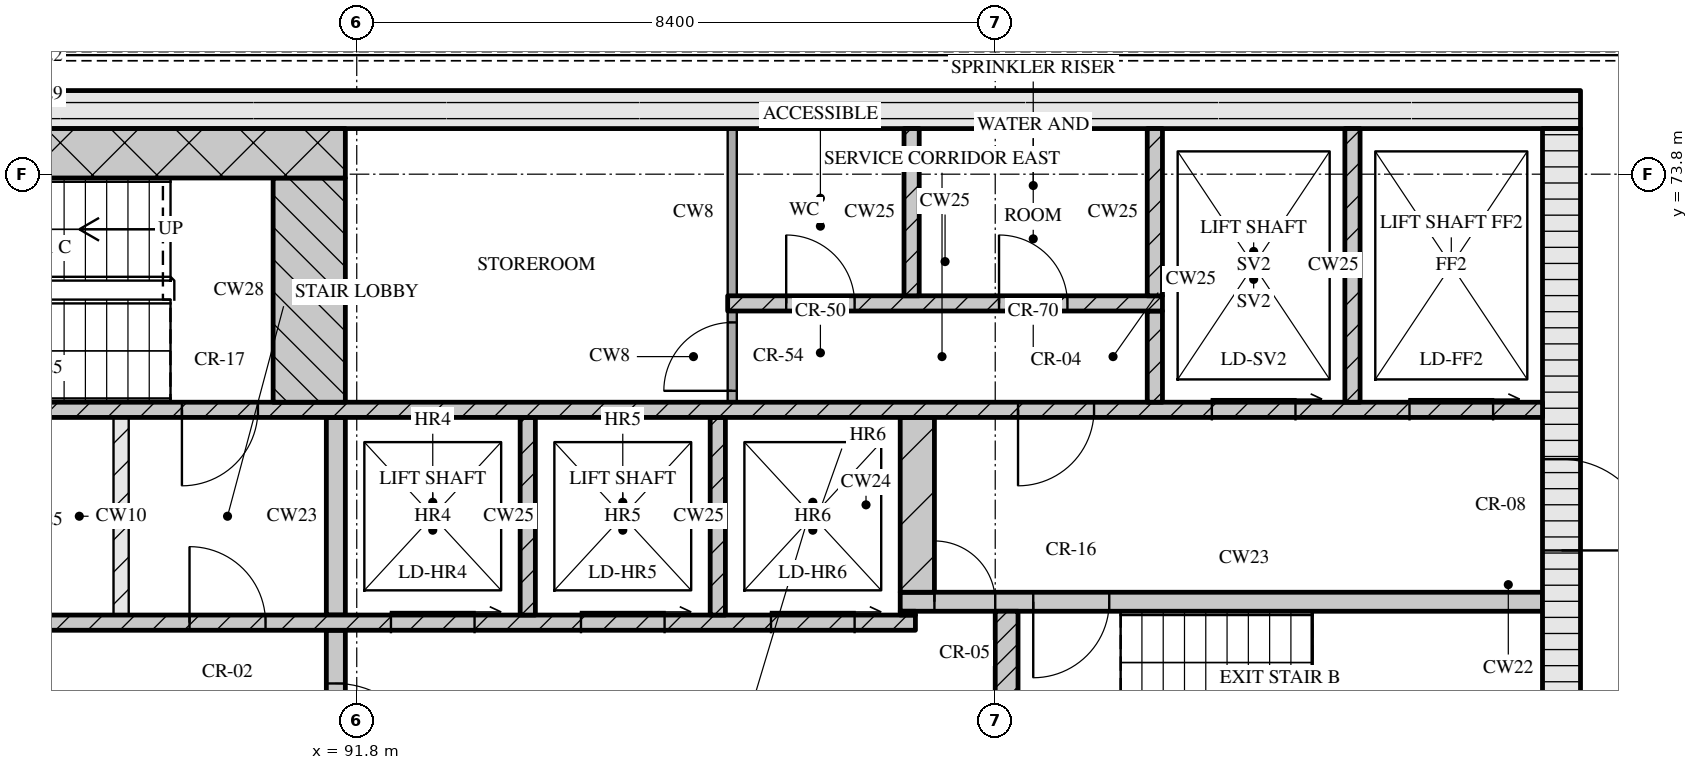
"""IFC4 building model, lengths in metres.
Left out: names, types, materials, properties, quantities, classifications, styles, units other than length and angle.
Written with IfcOpenShell. Run it as: python <this file> out.ifc"""

import sys

from ifc_helpers import new_model, si_unit, direction, frame, frame_2d, origin, place, context, subcontext, project, spatial, rectangle, extrude, element, fill, save


model = new_model("IFC4")
c1 = context("Model", 3, precision=1e-05, world=origin(), true_north=direction((0.0, 1.0)))
c2 = subcontext(c1, "Body", "Model", "MODEL_VIEW")
j1 = project(units=[si_unit("LENGTHUNIT", "METRE"), si_unit("PLANEANGLEUNIT", "RADIAN")], contexts=[c1])
p1 = place(None, origin())
s1 = spatial("IfcSite", under=j1, at=p1, CompositionType="ELEMENT")
p2 = place(p1, origin())
s2 = spatial("IfcBuilding", under=s1, at=p2, CompositionType="ELEMENT")
p3 = place(p2, frame((0.0, 0.0, 295.95)))
s3 = spatial("IfcBuildingStorey", under=s2, at=p3, CompositionType="ELEMENT", Elevation=295.95)
p4 = place(p3, frame((67.3, 74.65, 0.0), z_axis=(0.0, 0.0, 1.0), x_axis=(1.0, 0.0, 0.0)))
e1 = element("IfcWall", 1, at=p4, inside=s3, PredefinedType="SOLIDWALL", context=c2, shape_type="SweptSolid", body=[
    extrude(rectangle(XDim=40.6, YDim=0.5, at=frame_2d((20.3, 0.0))), origin(), (0.0, 0.0, 1.0), 3.32),
])
p5 = place(p3, frame((107.65, 62.4, 0.0), z_axis=(0.0, 0.0, 1.0), x_axis=(0.0, 1.0, 0.0)))
e2 = element("IfcWall", 2, at=p5, inside=s3, PredefinedType="SOLIDWALL", context=c2, shape_type="SweptSolid", body=[
    extrude(rectangle(XDim=12.0, YDim=0.5, at=frame_2d((6.0, 0.0))), origin(), (0.0, 0.0, 1.0), 3.32),
])
p6 = place(p5, frame((6.45, 0.0, 0.0)))
e3 = element("IfcOpeningElement", 3, at=p6, cuts=e2, PredefinedType="OPENING", context=c2, shape_type="SweptSolid", body=[
    extrude(rectangle(XDim=1.2, YDim=2.1, at=frame_2d((0.6, 1.05))), frame((0.0, 0.26, 0.0), z_axis=(0.0, -1.0, 0.0), x_axis=(1.0, 0.0, 0.0)), (0.0, 0.0, 1.0), 0.52),
])
p7 = place(p3, frame((91.525, 65.2, 0.0), z_axis=(0.0, 0.0, 1.0), x_axis=(0.0, 1.0, 0.0)))
e4 = element("IfcWall", 4, at=p7, inside=s3, PredefinedType="SOLIDWALL", context=c2, shape_type="SweptSolid", body=[
    extrude(rectangle(XDim=2.6, YDim=0.25, at=frame_2d((1.3, 0.0))), origin(), (0.0, 0.0, 1.0), 3.32),
])
p8 = place(p7, frame((0.7, 0.0, 0.0)))
e5 = element("IfcOpeningElement", 5, at=p8, cuts=e4, PredefinedType="OPENING", context=c2, shape_type="SweptSolid", body=[
    extrude(rectangle(XDim=1.2, YDim=2.1, at=frame_2d((0.6, 1.05))), frame((0.0, 0.135, 0.0), z_axis=(0.0, -1.0, 0.0), x_axis=(1.0, 0.0, 0.0)), (0.0, 0.0, 1.0), 0.27),
])
p9 = place(p3, frame((100.35, 65.2, 0.0), z_axis=(0.0, 0.0, 1.0), x_axis=(0.0, 1.0, 0.0)))
e6 = element("IfcWall", 6, at=p9, inside=s3, PredefinedType="SOLIDWALL", context=c2, shape_type="SweptSolid", body=[
    extrude(rectangle(XDim=2.85, YDim=0.3, at=frame_2d((1.425, 0.0))), origin(), (0.0, 0.0, 1.0), 3.32),
])
p10 = place(p3, frame((76.05, 67.9, 0.0), z_axis=(0.0, 0.0, 1.0), x_axis=(1.0, 0.0, 0.0)))
e7 = element("IfcWall", 7, at=p10, inside=s3, PredefinedType="SOLIDWALL", context=c2, shape_type="SweptSolid", body=[
    extrude(rectangle(XDim=23.1, YDim=0.2, at=frame_2d((11.55, 0.0))), origin(), (0.0, 0.0, 1.0), 3.32),
])
p11 = place(p10, frame((1.95, 0.0, 0.0)))
e8 = element("IfcOpeningElement", 8, at=p11, cuts=e7, PredefinedType="OPENING", context=c2, shape_type="SweptSolid", body=[
    extrude(rectangle(XDim=0.9, YDim=2.1, at=frame_2d((0.45, 1.05))), frame((0.0, 0.11, 0.0), z_axis=(0.0, -1.0, 0.0), x_axis=(1.0, 0.0, 0.0)), (0.0, 0.0, 1.0), 0.22),
])
p12 = place(p10, frame((5.66, 0.0, 0.0)))
e9 = element("IfcOpeningElement", 9, at=p12, cuts=e7, PredefinedType="OPENING", context=c2, shape_type="SweptSolid", body=[
    extrude(rectangle(XDim=0.9, YDim=2.1, at=frame_2d((0.45, 1.05))), frame((0.0, 0.11, 0.0), z_axis=(0.0, -1.0, 0.0), x_axis=(1.0, 0.0, 0.0)), (0.0, 0.0, 1.0), 0.22),
])
p13 = place(p10, frame((9.7, 0.0, 0.0)))
e10 = element("IfcOpeningElement", 10, at=p13, cuts=e7, PredefinedType="OPENING", context=c2, shape_type="SweptSolid", body=[
    extrude(rectangle(XDim=0.9, YDim=2.1, at=frame_2d((0.45, 1.05))), frame((0.0, 0.11, 0.0), z_axis=(0.0, -1.0, 0.0), x_axis=(1.0, 0.0, 0.0)), (0.0, 0.0, 1.0), 0.22),
])
p14 = place(p10, frame((13.55, 0.0, 0.0)))
e11 = element("IfcOpeningElement", 11, at=p14, cuts=e7, PredefinedType="OPENING", context=c2, shape_type="SweptSolid", body=[
    extrude(rectangle(XDim=1.0, YDim=2.1, at=frame_2d((0.5, 1.05))), frame((0.0, 0.11, 0.0), z_axis=(0.0, -1.0, 0.0), x_axis=(1.0, 0.0, 0.0)), (0.0, 0.0, 1.0), 0.22),
])
p15 = place(p10, frame((16.2, 0.0, 0.0)))
e12 = element("IfcOpeningElement", 12, at=p15, cuts=e7, PredefinedType="OPENING", context=c2, shape_type="SweptSolid", body=[
    extrude(rectangle(XDim=1.1, YDim=2.1, at=frame_2d((0.55, 1.05))), frame((0.0, 0.11, 0.0), z_axis=(0.0, -1.0, 0.0), x_axis=(1.0, 0.0, 0.0)), (0.0, 0.0, 1.0), 0.22),
])
p16 = place(p10, frame((18.7, 0.0, 0.0)))
e13 = element("IfcOpeningElement", 13, at=p16, cuts=e7, PredefinedType="OPENING", context=c2, shape_type="SweptSolid", body=[
    extrude(rectangle(XDim=1.1, YDim=2.1, at=frame_2d((0.55, 1.05))), frame((0.0, 0.11, 0.0), z_axis=(0.0, -1.0, 0.0), x_axis=(1.0, 0.0, 0.0)), (0.0, 0.0, 1.0), 0.22),
])
p17 = place(p10, frame((21.2, 0.0, 0.0)))
e14 = element("IfcOpeningElement", 14, at=p17, cuts=e7, PredefinedType="OPENING", context=c2, shape_type="SweptSolid", body=[
    extrude(rectangle(XDim=1.1, YDim=2.1, at=frame_2d((0.55, 1.05))), frame((0.0, 0.11, 0.0), z_axis=(0.0, -1.0, 0.0), x_axis=(1.0, 0.0, 0.0)), (0.0, 0.0, 1.0), 0.22),
])
p18 = place(p3, frame((88.7, 68.0, 0.0), z_axis=(0.0, 0.0, 1.0), x_axis=(0.0, 1.0, 0.0)))
e15 = element("IfcWall", 15, at=p18, inside=s3, PredefinedType="PARTITIONING", context=c2, shape_type="SweptSolid", body=[
    extrude(rectangle(XDim=2.6, YDim=0.2, at=frame_2d((1.3, 0.0))), origin(), (0.0, 0.0, 1.0), 3.32),
])
p19 = place(p3, frame((91.525, 68.0, 0.0), z_axis=(0.0, 0.0, 1.0), x_axis=(0.0, 1.0, 0.0)))
e16 = element("IfcWall", 16, at=p19, inside=s3, PredefinedType="SOLIDWALL", context=c2, shape_type="SweptSolid", body=[
    extrude(rectangle(XDim=2.6, YDim=0.25, at=frame_2d((1.3, 0.0))), origin(), (0.0, 0.0, 1.0), 3.32),
])
for number, where, z_axis, x_axis in (
    (17, (94.05, 68.0, 0.0), (0.0, 0.0, 1.0), (0.0, 1.0, 0.0)),
    (18, (96.55, 68.0, 0.0), (0.0, 0.0, 1.0), (0.0, 1.0, 0.0)),
):
    element("IfcWall", number, at=place(p3, frame(where, z_axis=z_axis, x_axis=x_axis)), inside=s3, PredefinedType="SOLIDWALL", context=c2, shape_type="SweptSolid", body=[
        extrude(rectangle(XDim=2.6, YDim=0.2, at=frame_2d((1.3, 0.0))), origin(), (0.0, 0.0, 1.0), 3.32),
    ])
p20 = place(p3, frame((98.95, 68.025, 0.0), z_axis=(0.0, 0.0, 1.0), x_axis=(1.0, 0.0, 0.0)))
e19 = element("IfcWall", 19, at=p20, inside=s3, PredefinedType="SOLIDWALL", context=c2, shape_type="SweptSolid", body=[
    extrude(rectangle(XDim=0.2, YDim=0.05, at=frame_2d((0.1, 0.0))), origin(), (0.0, 0.0, 1.0), 3.32),
])
p21 = place(p3, frame((98.95, 68.175, 0.0), z_axis=(0.0, 0.0, 1.0), x_axis=(1.0, 0.0, 0.0)))
e20 = element("IfcWall", 20, at=p21, inside=s3, PredefinedType="SOLIDWALL", context=c2, shape_type="SweptSolid", body=[
    extrude(rectangle(XDim=8.45, YDim=0.25, at=frame_2d((4.225, 0.0))), origin(), (0.0, 0.0, 1.0), 3.32),
])
p22 = place(p21, frame((0.45, 0.0, 0.0)))
e21 = element("IfcOpeningElement", 21, at=p22, cuts=e20, PredefinedType="OPENING", context=c2, shape_type="SweptSolid", body=[
    extrude(rectangle(XDim=0.8, YDim=2.1, at=frame_2d((0.4, 1.05))), frame((0.0, 0.135, 0.0), z_axis=(0.0, -1.0, 0.0), x_axis=(1.0, 0.0, 0.0)), (0.0, 0.0, 1.0), 0.27),
])
p23 = place(p21, frame((1.75, 0.0, 0.0)))
e22 = element("IfcOpeningElement", 22, at=p23, cuts=e20, PredefinedType="OPENING", context=c2, shape_type="SweptSolid", body=[
    extrude(rectangle(XDim=1.0, YDim=2.1, at=frame_2d((0.5, 1.05))), frame((0.0, 0.135, 0.0), z_axis=(0.0, -1.0, 0.0), x_axis=(1.0, 0.0, 0.0)), (0.0, 0.0, 1.0), 0.27),
])
p24 = place(p3, frame((99.175, 68.3, 0.0), z_axis=(0.0, 0.0, 1.0), x_axis=(0.0, 1.0, 0.0)))
e23 = element("IfcWall", 23, at=p24, inside=s3, PredefinedType="SOLIDWALL", context=c2, shape_type="SweptSolid", body=[
    extrude(rectangle(XDim=2.3, YDim=0.45, at=frame_2d((1.15, 0.0))), origin(), (0.0, 0.0, 1.0), 3.32),
])
p25 = place(p3, frame((67.8, 70.7, 0.0), z_axis=(0.0, 0.0, 1.0), x_axis=(1.0, 0.0, 0.0)))
e24 = element("IfcWall", 24, at=p25, inside=s3, PredefinedType="SOLIDWALL", context=c2, shape_type="SweptSolid", body=[
    extrude(rectangle(XDim=39.6, YDim=0.2, at=frame_2d((19.8, 0.0))), origin(), (0.0, 0.0, 1.0), 3.32),
])
p26 = place(p25, frame((0.65, 0.0, 0.0)))
e25 = element("IfcOpeningElement", 25, at=p26, cuts=e24, PredefinedType="OPENING", context=c2, shape_type="SweptSolid", body=[
    extrude(rectangle(XDim=1.1, YDim=2.1, at=frame_2d((0.55, 1.05))), frame((0.0, 0.11, 0.0), z_axis=(0.0, -1.0, 0.0), x_axis=(1.0, 0.0, 0.0)), (0.0, 0.0, 1.0), 0.22),
])
p27 = place(p25, frame((3.25, 0.0, 0.0)))
e26 = element("IfcOpeningElement", 26, at=p27, cuts=e24, PredefinedType="OPENING", context=c2, shape_type="SweptSolid", body=[
    extrude(rectangle(XDim=1.1, YDim=2.1, at=frame_2d((0.55, 1.05))), frame((0.0, 0.11, 0.0), z_axis=(0.0, -1.0, 0.0), x_axis=(1.0, 0.0, 0.0)), (0.0, 0.0, 1.0), 0.22),
])
p28 = place(p25, frame((5.9, 0.0, 0.0)))
e27 = element("IfcOpeningElement", 27, at=p28, cuts=e24, PredefinedType="OPENING", context=c2, shape_type="SweptSolid", body=[
    extrude(rectangle(XDim=1.0, YDim=2.1, at=frame_2d((0.5, 1.05))), frame((0.0, 0.11, 0.0), z_axis=(0.0, -1.0, 0.0), x_axis=(1.0, 0.0, 0.0)), (0.0, 0.0, 1.0), 0.22),
])
p29 = place(p25, frame((21.7, 0.0, 0.0)))
e28 = element("IfcOpeningElement", 28, at=p29, cuts=e24, PredefinedType="OPENING", context=c2, shape_type="SweptSolid", body=[
    extrude(rectangle(XDim=1.0, YDim=2.1, at=frame_2d((0.5, 1.05))), frame((0.0, 0.11, 0.0), z_axis=(0.0, -1.0, 0.0), x_axis=(1.0, 0.0, 0.0)), (0.0, 0.0, 1.0), 0.22),
])
p30 = place(p25, frame((32.7, 0.0, 0.0)))
e29 = element("IfcOpeningElement", 29, at=p30, cuts=e24, PredefinedType="OPENING", context=c2, shape_type="SweptSolid", body=[
    extrude(rectangle(XDim=1.0, YDim=2.1, at=frame_2d((0.5, 1.05))), frame((0.0, 0.11, 0.0), z_axis=(0.0, -1.0, 0.0), x_axis=(1.0, 0.0, 0.0)), (0.0, 0.0, 1.0), 0.22),
])
p31 = place(p25, frame((35.25, 0.0, 0.0)))
e30 = element("IfcOpeningElement", 30, at=p31, cuts=e24, PredefinedType="OPENING", context=c2, shape_type="SweptSolid", body=[
    extrude(rectangle(XDim=1.1, YDim=2.1, at=frame_2d((0.55, 1.05))), frame((0.0, 0.11, 0.0), z_axis=(0.0, -1.0, 0.0), x_axis=(1.0, 0.0, 0.0)), (0.0, 0.0, 1.0), 0.22),
])
p32 = place(p25, frame((37.85, 0.0, 0.0)))
e31 = element("IfcOpeningElement", 31, at=p32, cuts=e24, PredefinedType="OPENING", context=c2, shape_type="SweptSolid", body=[
    extrude(rectangle(XDim=1.1, YDim=2.1, at=frame_2d((0.55, 1.05))), frame((0.0, 0.11, 0.0), z_axis=(0.0, -1.0, 0.0), x_axis=(1.0, 0.0, 0.0)), (0.0, 0.0, 1.0), 0.22),
])
p33 = place(p3, frame((91.175, 70.8, 0.0), z_axis=(0.0, 0.0, 1.0), x_axis=(0.0, 1.0, 0.0)))
e32 = element("IfcWall", 32, at=p33, inside=s3, PredefinedType="SOLIDWALL", context=c2, shape_type="SweptSolid", body=[
    extrude(rectangle(XDim=2.95, YDim=0.95, at=frame_2d((1.475, 0.0))), origin(), (0.0, 0.0, 1.0), 3.32),
])
p34 = place(p3, frame((96.74, 70.8, 0.0), z_axis=(0.0, 0.0, 1.0), x_axis=(0.0, 1.0, 0.0)))
e33 = element("IfcWall", 33, at=p34, inside=s3, PredefinedType="PARTITIONING", context=c2, shape_type="SweptSolid", body=[
    extrude(rectangle(XDim=1.2, YDim=0.12, at=frame_2d((0.6, 0.0))), origin(), (0.0, 0.0, 1.0), 3.32),
])
p35 = place(p34, frame((0.15, 0.0, 0.0)))
e34 = element("IfcOpeningElement", 34, at=p35, cuts=e33, PredefinedType="OPENING", context=c2, shape_type="SweptSolid", body=[
    extrude(rectangle(XDim=0.9, YDim=2.1, at=frame_2d((0.45, 1.05))), frame((0.0, 0.07, 0.0), z_axis=(0.0, -1.0, 0.0), x_axis=(1.0, 0.0, 0.0)), (0.0, 0.0, 1.0), 0.14),
])
p36 = place(p3, frame((102.3, 70.8, 0.0), z_axis=(0.0, 0.0, 1.0), x_axis=(0.0, 1.0, 0.0)))
e35 = element("IfcWall", 35, at=p36, inside=s3, PredefinedType="SOLIDWALL", context=c2, shape_type="SweptSolid", body=[
    extrude(rectangle(XDim=1.2, YDim=0.2, at=frame_2d((0.6, 0.0))), origin(), (0.0, 0.0, 1.0), 3.32),
])
p37 = place(p3, frame((104.9, 70.8, 0.0), z_axis=(0.0, 0.0, 1.0), x_axis=(0.0, 1.0, 0.0)))
e36 = element("IfcWall", 36, at=p37, inside=s3, PredefinedType="SOLIDWALL", context=c2, shape_type="SweptSolid", body=[
    extrude(rectangle(XDim=3.6, YDim=0.2, at=frame_2d((1.8, 0.0))), origin(), (0.0, 0.0, 1.0), 3.32),
])
p38 = place(p3, frame((96.68, 72.1, 0.0), z_axis=(0.0, 0.0, 1.0), x_axis=(1.0, 0.0, 0.0)))
e37 = element("IfcWall", 37, at=p38, inside=s3, PredefinedType="SOLIDWALL", context=c2, shape_type="SweptSolid", body=[
    extrude(rectangle(XDim=5.72, YDim=0.2, at=frame_2d((2.86, 0.0))), origin(), (0.0, 0.0, 1.0), 3.32),
])
p39 = place(p38, frame((0.77, 0.0, 0.0)))
e38 = element("IfcOpeningElement", 38, at=p39, cuts=e37, PredefinedType="OPENING", context=c2, shape_type="SweptSolid", body=[
    extrude(rectangle(XDim=0.9, YDim=2.1, at=frame_2d((0.45, 1.05))), frame((0.0, 0.11, 0.0), z_axis=(0.0, -1.0, 0.0), x_axis=(1.0, 0.0, 0.0)), (0.0, 0.0, 1.0), 0.22),
])
p40 = place(p38, frame((3.57, 0.0, 0.0)))
e39 = element("IfcOpeningElement", 39, at=p40, cuts=e37, PredefinedType="OPENING", context=c2, shape_type="SweptSolid", body=[
    extrude(rectangle(XDim=0.9, YDim=2.1, at=frame_2d((0.45, 1.05))), frame((0.0, 0.11, 0.0), z_axis=(0.0, -1.0, 0.0), x_axis=(1.0, 0.0, 0.0)), (0.0, 0.0, 1.0), 0.22),
])
p41 = place(p3, frame((96.74, 72.2, 0.0), z_axis=(0.0, 0.0, 1.0), x_axis=(0.0, 1.0, 0.0)))
e40 = element("IfcWall", 40, at=p41, inside=s3, PredefinedType="PARTITIONING", context=c2, shape_type="SweptSolid", body=[
    extrude(rectangle(XDim=2.2, YDim=0.12, at=frame_2d((1.1, 0.0))), origin(), (0.0, 0.0, 1.0), 3.32),
])
for number, where, z_axis, x_axis in (
    (41, (99.1, 72.2, 0.0), (0.0, 0.0, 1.0), (0.0, 1.0, 0.0)),
    (42, (102.3, 72.2, 0.0), (0.0, 0.0, 1.0), (0.0, 1.0, 0.0)),
):
    element("IfcWall", number, at=place(p3, frame(where, z_axis=z_axis, x_axis=x_axis)), inside=s3, PredefinedType="SOLIDWALL", context=c2, shape_type="SweptSolid", body=[
        extrude(rectangle(XDim=2.2, YDim=0.2, at=frame_2d((1.1, 0.0))), origin(), (0.0, 0.0, 1.0), 3.32),
    ])
p42 = place(p3, frame((83.55, 74.075, 0.0), z_axis=(0.0, 0.0, 1.0), x_axis=(1.0, 0.0, 0.0)))
e43 = element("IfcWall", 43, at=p42, inside=s3, PredefinedType="SOLIDWALL", context=c2, shape_type="SweptSolid", body=[
    extrude(rectangle(XDim=8.1, YDim=0.65, at=frame_2d((4.05, 0.0))), origin(), (0.0, 0.0, 1.0), 3.32),
])
p43 = place(p8, origin())
e44 = element("IfcDoor", 44, at=p43, inside=s3, OperationType="SINGLE_SWING_RIGHT", PredefinedType="DOOR", context=c2, shape_type="SweptSolid", body=[
    extrude(rectangle(XDim=1.2, YDim=2.1, at=frame_2d((0.6, 1.05))), frame((0.0, 0.025, 0.0), z_axis=(0.0, -1.0, 0.0), x_axis=(1.0, 0.0, 0.0)), (0.0, 0.0, 1.0), 0.05),
])
fill(e5, e44)
p44 = place(p14, origin())
e45 = element("IfcDoor", 45, at=p44, inside=s3, OperationType="SINGLE_SWING_LEFT", PredefinedType="DOOR", context=c2, shape_type="SweptSolid", body=[
    extrude(rectangle(XDim=1.0, YDim=2.1, at=frame_2d((0.5, 1.05))), frame((0.0, 0.025, 0.0), z_axis=(0.0, -1.0, 0.0), x_axis=(1.0, 0.0, 0.0)), (0.0, 0.0, 1.0), 0.05),
])
fill(e11, e45)
p45 = place(p15, origin())
e46 = element("IfcDoor", 46, at=p45, inside=s3, OperationType="SLIDING_TO_RIGHT", PredefinedType="DOOR", context=c2, shape_type="SweptSolid", body=[
    extrude(rectangle(XDim=1.1, YDim=2.1, at=frame_2d((0.55, 1.05))), frame((0.0, 0.025, 0.0), z_axis=(0.0, -1.0, 0.0), x_axis=(1.0, 0.0, 0.0)), (0.0, 0.0, 1.0), 0.05),
])
fill(e12, e46)
p46 = place(p16, origin())
e47 = element("IfcDoor", 47, at=p46, inside=s3, OperationType="SLIDING_TO_RIGHT", PredefinedType="DOOR", context=c2, shape_type="SweptSolid", body=[
    extrude(rectangle(XDim=1.1, YDim=2.1, at=frame_2d((0.55, 1.05))), frame((0.0, 0.025, 0.0), z_axis=(0.0, -1.0, 0.0), x_axis=(1.0, 0.0, 0.0)), (0.0, 0.0, 1.0), 0.05),
])
fill(e13, e47)
p47 = place(p17, origin())
e48 = element("IfcDoor", 48, at=p47, inside=s3, OperationType="SLIDING_TO_RIGHT", PredefinedType="DOOR", context=c2, shape_type="SweptSolid", body=[
    extrude(rectangle(XDim=1.1, YDim=2.1, at=frame_2d((0.55, 1.05))), frame((0.0, 0.025, 0.0), z_axis=(0.0, -1.0, 0.0), x_axis=(1.0, 0.0, 0.0)), (0.0, 0.0, 1.0), 0.05),
])
fill(e14, e48)
p48 = place(p22, origin())
e49 = element("IfcDoor", 49, at=p48, inside=s3, OperationType="SINGLE_SWING_LEFT", PredefinedType="DOOR", context=c2, shape_type="SweptSolid", body=[
    extrude(rectangle(XDim=0.8, YDim=2.1, at=frame_2d((0.4, 1.05))), frame((0.0, 0.025, 0.0), z_axis=(0.0, -1.0, 0.0), x_axis=(1.0, 0.0, 0.0)), (0.0, 0.0, 1.0), 0.05),
])
fill(e21, e49)
p49 = place(p23, origin())
e50 = element("IfcDoor", 50, at=p49, inside=s3, OperationType="SINGLE_SWING_RIGHT", PredefinedType="DOOR", context=c2, shape_type="SweptSolid", body=[
    extrude(rectangle(XDim=1.0, YDim=2.1, at=frame_2d((0.5, 1.05))), frame((0.0, 0.025, 0.0), z_axis=(0.0, -1.0, 0.0), x_axis=(1.0, 0.0, 0.0)), (0.0, 0.0, 1.0), 0.05),
])
fill(e22, e50)
p50 = place(p6, origin())
e51 = element("IfcDoor", 51, at=p50, inside=s3, OperationType="SINGLE_SWING_RIGHT", PredefinedType="DOOR", context=c2, shape_type="SweptSolid", body=[
    extrude(rectangle(XDim=1.2, YDim=2.1, at=frame_2d((0.6, 1.05))), frame((0.0, 0.025, 0.0), z_axis=(0.0, -1.0, 0.0), x_axis=(1.0, 0.0, 0.0)), (0.0, 0.0, 1.0), 0.05),
])
fill(e3, e51)
p51 = place(p29, origin())
e52 = element("IfcDoor", 52, at=p51, inside=s3, OperationType="SINGLE_SWING_RIGHT", PredefinedType="DOOR", context=c2, shape_type="SweptSolid", body=[
    extrude(rectangle(XDim=1.0, YDim=2.1, at=frame_2d((0.5, 1.05))), frame((0.0, 0.025, 0.0), z_axis=(0.0, -1.0, 0.0), x_axis=(1.0, 0.0, 0.0)), (0.0, 0.0, 1.0), 0.05),
])
fill(e28, e52)
p52 = place(p30, origin())
e53 = element("IfcDoor", 53, at=p52, inside=s3, OperationType="SINGLE_SWING_RIGHT", PredefinedType="DOOR", context=c2, shape_type="SweptSolid", body=[
    extrude(rectangle(XDim=1.0, YDim=2.1, at=frame_2d((0.5, 1.05))), frame((0.0, 0.025, 0.0), z_axis=(0.0, -1.0, 0.0), x_axis=(1.0, 0.0, 0.0)), (0.0, 0.0, 1.0), 0.05),
])
fill(e29, e53)
p53 = place(p31, origin())
e54 = element("IfcDoor", 54, at=p53, inside=s3, OperationType="SLIDING_TO_RIGHT", PredefinedType="DOOR", context=c2, shape_type="SweptSolid", body=[
    extrude(rectangle(XDim=1.1, YDim=2.1, at=frame_2d((0.55, 1.05))), frame((0.0, 0.025, 0.0), z_axis=(0.0, -1.0, 0.0), x_axis=(1.0, 0.0, 0.0)), (0.0, 0.0, 1.0), 0.05),
])
fill(e30, e54)
p54 = place(p32, origin())
e55 = element("IfcDoor", 55, at=p54, inside=s3, OperationType="SLIDING_TO_RIGHT", PredefinedType="DOOR", context=c2, shape_type="SweptSolid", body=[
    extrude(rectangle(XDim=1.1, YDim=2.1, at=frame_2d((0.55, 1.05))), frame((0.0, 0.025, 0.0), z_axis=(0.0, -1.0, 0.0), x_axis=(1.0, 0.0, 0.0)), (0.0, 0.0, 1.0), 0.05),
])
fill(e31, e55)
p55 = place(p35, origin())
e56 = element("IfcDoor", 56, at=p55, inside=s3, OperationType="SINGLE_SWING_LEFT", PredefinedType="DOOR", context=c2, shape_type="SweptSolid", body=[
    extrude(rectangle(XDim=0.9, YDim=2.1, at=frame_2d((0.45, 1.05))), frame((0.0, 0.025, 0.0), z_axis=(0.0, -1.0, 0.0), x_axis=(1.0, 0.0, 0.0)), (0.0, 0.0, 1.0), 0.05),
])
fill(e34, e56)
p56 = place(p39, origin())
e57 = element("IfcDoor", 57, at=p56, inside=s3, OperationType="SINGLE_SWING_LEFT", PredefinedType="DOOR", context=c2, shape_type="SweptSolid", body=[
    extrude(rectangle(XDim=0.9, YDim=2.1, at=frame_2d((0.45, 1.05))), frame((0.0, 0.025, 0.0), z_axis=(0.0, -1.0, 0.0), x_axis=(1.0, 0.0, 0.0)), (0.0, 0.0, 1.0), 0.05),
])
fill(e38, e57)
p57 = place(p40, origin())
e58 = element("IfcDoor", 58, at=p57, inside=s3, OperationType="SINGLE_SWING_LEFT", PredefinedType="DOOR", context=c2, shape_type="SweptSolid", body=[
    extrude(rectangle(XDim=0.9, YDim=2.1, at=frame_2d((0.45, 1.05))), frame((0.0, 0.025, 0.0), z_axis=(0.0, -1.0, 0.0), x_axis=(1.0, 0.0, 0.0)), (0.0, 0.0, 1.0), 0.05),
])
fill(e39, e58)
save(model, sys.argv[1])
